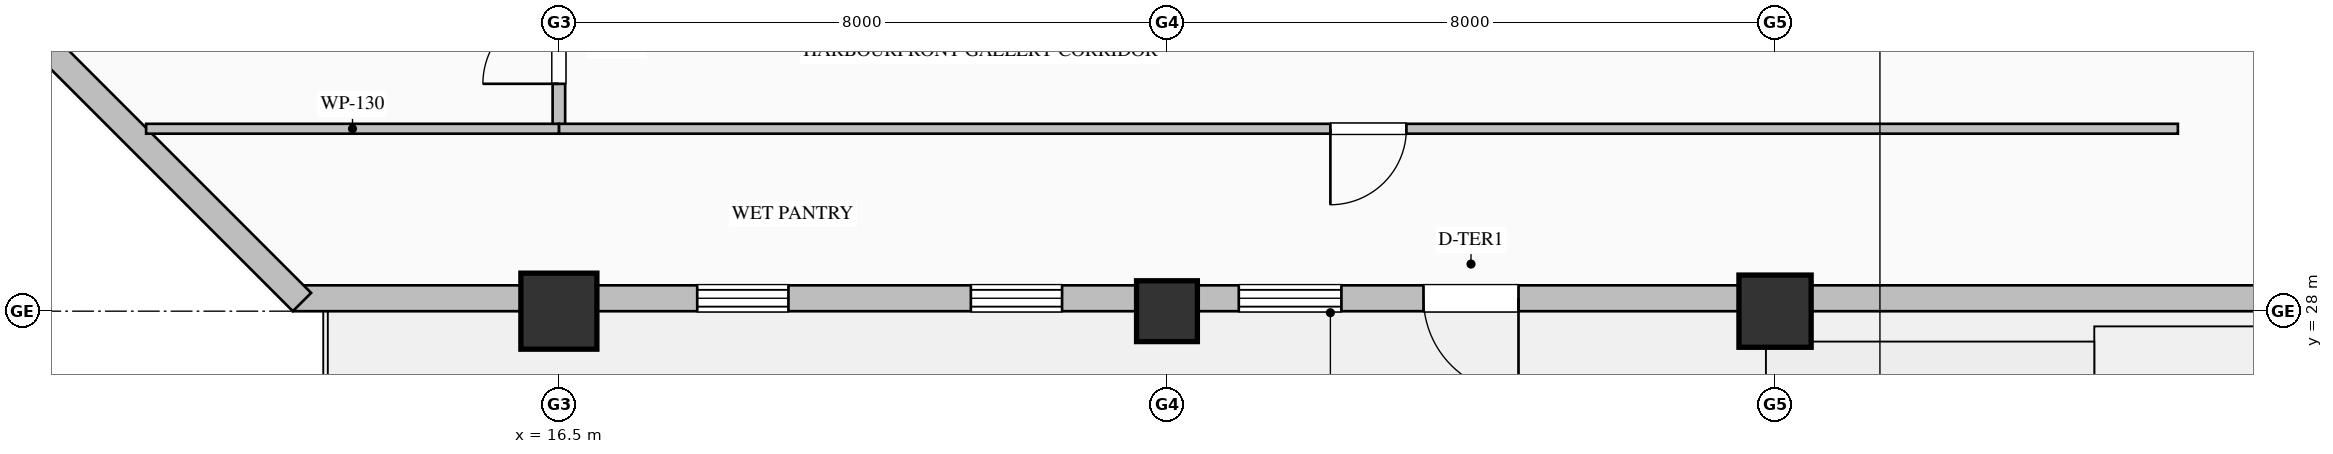
"""IFC4 building model, lengths in metres.
Left out: names, types, materials, properties, quantities, classifications, styles, units other than length and angle.
Written with IfcOpenShell. Run it as: python <this file> out.ifc"""

import sys

from ifc_helpers import new_model, si_unit, direction, frame, frame_2d, origin, origin_2d, place, context, subcontext, project, spatial, rectangle, hollow_rectangle, hollow_circle, extrude, element, fill, save


model = new_model("IFC4")
c1 = context("Model", 3, precision=1e-05, world=origin(), true_north=direction((0.0, 1.0)))
c2 = subcontext(c1, "Body", "Model", "MODEL_VIEW")
j1 = project(units=[si_unit("LENGTHUNIT", "METRE"), si_unit("PLANEANGLEUNIT", "RADIAN")], contexts=[c1])
p1 = place(None, origin())
s1 = spatial("IfcSite", under=j1, at=p1, CompositionType="ELEMENT")
p2 = place(p1, origin())
s2 = spatial("IfcBuilding", under=s1, at=p2, CompositionType="ELEMENT")
p3 = place(p2, frame((0.0, 0.0, 273.8)))
s3 = spatial("IfcBuildingStorey", under=s2, at=p3, CompositionType="ELEMENT", Elevation=273.8)
p4 = place(p3, frame((16.5, 28.0, 0.0), z_axis=(0.0, 0.0, 1.0), x_axis=(1.0, 0.0, 0.0)))
e1 = element("IfcColumn", 1, at=p4, inside=s3, PredefinedType="COLUMN", context=c2, shape_type="SweptSolid", body=[
    extrude(hollow_circle(Radius=0.5, WallThickness=0.036, at=origin_2d()), origin(), (0.0, 0.0, 1.0), 4.0),
])
p5 = place(p3, frame((24.5, 28.0, 0.0), z_axis=(0.0, 0.0, 1.0), x_axis=(1.0, 0.0, 0.0)))
e2 = element("IfcColumn", 2, at=p5, inside=s3, PredefinedType="COLUMN", context=c2, shape_type="SweptSolid", body=[
    extrude(hollow_rectangle(XDim=0.8, YDim=0.8, WallThickness=0.032, at=origin_2d()), origin(), (0.0, 0.0, 1.0), 4.0),
])
p6 = place(p3, frame((32.5, 28.0, 0.0), z_axis=(0.0, 0.0, 1.0), x_axis=(1.0, 0.0, 0.0)))
e3 = element("IfcColumn", 3, at=p6, inside=s3, PredefinedType="COLUMN", context=c2, shape_type="SweptSolid", body=[
    extrude(hollow_rectangle(XDim=0.95, YDim=0.95, WallThickness=0.036, at=origin_2d()), origin(), (0.0, 0.0, 1.0), 4.0),
])
p7 = place(p3, frame((40.52, 28.17, 0.0), z_axis=(0.0, 0.0, 1.0), x_axis=(-1.0, 0.0, 0.0)))
e4 = element("IfcWall", 4, at=p7, inside=s3, PredefinedType="SOLIDWALL", context=c2, shape_type="SweptSolid", body=[
    extrude(rectangle(XDim=27.52, YDim=0.34, at=frame_2d((13.76, 0.0))), origin(), (0.0, 0.0, 1.0), 3.187),
])
p8 = place(p7, frame((13.725, 0.0, 0.9)))
e5 = element("IfcOpeningElement", 5, at=p8, cuts=e4, PredefinedType="OPENING", context=c2, shape_type="SweptSolid", body=[
    extrude(rectangle(XDim=1.35, YDim=1.85, at=frame_2d((0.675, 0.925))), frame((0.0, 0.18, 0.0), z_axis=(0.0, -1.0, 0.0), x_axis=(1.0, 0.0, 0.0)), (0.0, 0.0, 1.0), 0.36),
])
p9 = place(p7, frame((17.4, 0.0, 0.7)))
e6 = element("IfcOpeningElement", 6, at=p9, cuts=e4, PredefinedType="OPENING", context=c2, shape_type="SweptSolid", body=[
    extrude(rectangle(XDim=1.2, YDim=1.85, at=frame_2d((0.6, 0.925))), frame((0.0, 0.18, 0.0), z_axis=(0.0, -1.0, 0.0), x_axis=(1.0, 0.0, 0.0)), (0.0, 0.0, 1.0), 0.36),
])
p10 = place(p7, frame((21.0, 0.0, 0.9)))
e7 = element("IfcOpeningElement", 7, at=p10, cuts=e4, PredefinedType="OPENING", context=c2, shape_type="SweptSolid", body=[
    extrude(rectangle(XDim=1.2, YDim=1.85, at=frame_2d((0.6, 0.925))), frame((0.0, 0.18, 0.0), z_axis=(0.0, -1.0, 0.0), x_axis=(1.0, 0.0, 0.0)), (0.0, 0.0, 1.0), 0.36),
])
p11 = place(p7, frame((11.395, 0.0, 0.0)))
e8 = element("IfcOpeningElement", 8, at=p11, cuts=e4, PredefinedType="OPENING", context=c2, shape_type="SweptSolid", body=[
    extrude(rectangle(XDim=1.25, YDim=2.25, at=frame_2d((0.625, 1.125))), frame((0.0, 0.18, 0.0), z_axis=(0.0, -1.0, 0.0), x_axis=(1.0, 0.0, 0.0)), (0.0, 0.0, 1.0), 0.36),
])
p12 = place(p3, frame((13.12, 28.12, 0.0), z_axis=(0.0, 0.0, 1.0), x_axis=(-0.707106781187, 0.707106781187, 0.0)))
e9 = element("IfcWall", 9, at=p12, inside=s3, PredefinedType="SOLIDWALL", context=c2, shape_type="SweptSolid", body=[
    extrude(rectangle(XDim=5.657, YDim=0.34, at=frame_2d((2.828, 0.0))), origin(), (0.0, 0.0, 1.0), 3.775),
])
p13 = place(p3, frame((16.5, 30.457, 0.0), z_axis=(0.0, 0.0, 1.0), x_axis=(0.0, 1.0, 0.0)))
e10 = element("IfcWall", 10, at=p13, inside=s3, PredefinedType="PARTITIONING", context=c2, shape_type="SweptSolid", body=[
    extrude(rectangle(XDim=2.068, YDim=0.165, at=frame_2d((1.034, 0.0))), origin(), (0.0, 0.0, 1.0), 3.179),
])
p14 = place(p13, frame((0.534, 0.0, 0.0)))
e11 = element("IfcOpeningElement", 11, at=p14, cuts=e10, PredefinedType="OPENING", context=c2, shape_type="SweptSolid", body=[
    extrude(rectangle(XDim=1.0, YDim=2.15, at=frame_2d((0.5, 1.075))), frame((0.0, 0.093, 0.0), z_axis=(0.0, -1.0, 0.0), x_axis=(1.0, 0.0, 0.0)), (0.0, 0.0, 1.0), 0.185),
])
p15 = place(p3, frame((37.8, 30.4, 0.0), z_axis=(0.0, 0.0, 1.0), x_axis=(-1.0, 0.0, 0.0)))
e12 = element("IfcWall", 12, at=p15, inside=s3, PredefinedType="PARTITIONING", context=c2, shape_type="SweptSolid", body=[
    extrude(rectangle(XDim=21.3, YDim=0.13, at=frame_2d((10.65, 0.0))), origin(), (0.0, 0.0, 1.0), 3.775),
])
p16 = place(p15, frame((10.15, 0.0, 0.0)))
e13 = element("IfcOpeningElement", 13, at=p16, cuts=e12, PredefinedType="OPENING", context=c2, shape_type="SweptSolid", body=[
    extrude(rectangle(XDim=1.0, YDim=2.15, at=frame_2d((0.5, 1.075))), frame((0.0, 0.075, 0.0), z_axis=(0.0, -1.0, 0.0), x_axis=(1.0, 0.0, 0.0)), (0.0, 0.0, 1.0), 0.15),
])
p17 = place(p3, frame((16.5, 30.4, 0.0), z_axis=(0.0, 0.0, 1.0), x_axis=(-1.0, 0.0, 0.0)))
e14 = element("IfcWall", 14, at=p17, inside=s3, PredefinedType="PARTITIONING", context=c2, shape_type="SweptSolid", body=[
    extrude(rectangle(XDim=5.43, YDim=0.13, at=frame_2d((2.715, 0.0))), origin(), (0.0, 0.0, 1.0), 3.775),
])
p18 = place(p8, origin())
e15 = element("IfcWindow", 15, at=p18, inside=s3, PartitioningType="DOUBLE_PANEL_VERTICAL", PredefinedType="WINDOW", context=c2, shape_type="SweptSolid", body=[
    extrude(rectangle(XDim=1.35, YDim=1.85, at=frame_2d((0.675, 0.925))), frame((0.0, 0.15, 0.0), z_axis=(0.0, -1.0, 0.0), x_axis=(1.0, 0.0, 0.0)), (0.0, 0.0, 1.0), 0.06),
])
fill(e5, e15)
p19 = place(p9, origin())
e16 = element("IfcWindow", 16, at=p19, inside=s3, PartitioningType="DOUBLE_PANEL_VERTICAL", PredefinedType="WINDOW", context=c2, shape_type="SweptSolid", body=[
    extrude(rectangle(XDim=1.2, YDim=1.85, at=frame_2d((0.6, 0.925))), frame((0.0, 0.15, 0.0), z_axis=(0.0, -1.0, 0.0), x_axis=(1.0, 0.0, 0.0)), (0.0, 0.0, 1.0), 0.06),
])
fill(e6, e16)
p20 = place(p10, origin())
e17 = element("IfcWindow", 17, at=p20, inside=s3, PartitioningType="DOUBLE_PANEL_VERTICAL", PredefinedType="WINDOW", context=c2, shape_type="SweptSolid", body=[
    extrude(rectangle(XDim=1.2, YDim=1.85, at=frame_2d((0.6, 0.925))), frame((0.0, 0.15, 0.0), z_axis=(0.0, -1.0, 0.0), x_axis=(1.0, 0.0, 0.0)), (0.0, 0.0, 1.0), 0.06),
])
fill(e7, e17)
p21 = place(p11, origin())
e18 = element("IfcDoor", 18, at=p21, inside=s3, OperationType="SINGLE_SWING_LEFT", PredefinedType="DOOR", context=c2, shape_type="SweptSolid", body=[
    extrude(rectangle(XDim=1.25, YDim=2.25, at=frame_2d((0.625, 1.125))), frame((0.0, 0.025, 0.0), z_axis=(0.0, -1.0, 0.0), x_axis=(1.0, 0.0, 0.0)), (0.0, 0.0, 1.0), 0.05),
])
fill(e8, e18)
p22 = place(p14, origin())
e19 = element("IfcDoor", 19, at=p22, inside=s3, OperationType="SINGLE_SWING_LEFT", PredefinedType="DOOR", context=c2, shape_type="SweptSolid", body=[
    extrude(rectangle(XDim=1.0, YDim=2.15, at=frame_2d((0.5, 1.075))), frame((0.0, 0.025, 0.0), z_axis=(0.0, -1.0, 0.0), x_axis=(1.0, 0.0, 0.0)), (0.0, 0.0, 1.0), 0.05),
])
fill(e11, e19)
p23 = place(p16, origin())
e20 = element("IfcDoor", 20, at=p23, inside=s3, OperationType="SINGLE_SWING_RIGHT", PredefinedType="DOOR", context=c2, shape_type="SweptSolid", body=[
    extrude(rectangle(XDim=1.0, YDim=2.15, at=frame_2d((0.5, 1.075))), frame((0.0, 0.025, 0.0), z_axis=(0.0, -1.0, 0.0), x_axis=(1.0, 0.0, 0.0)), (0.0, 0.0, 1.0), 0.05),
])
fill(e13, e20)
save(model, sys.argv[1])
